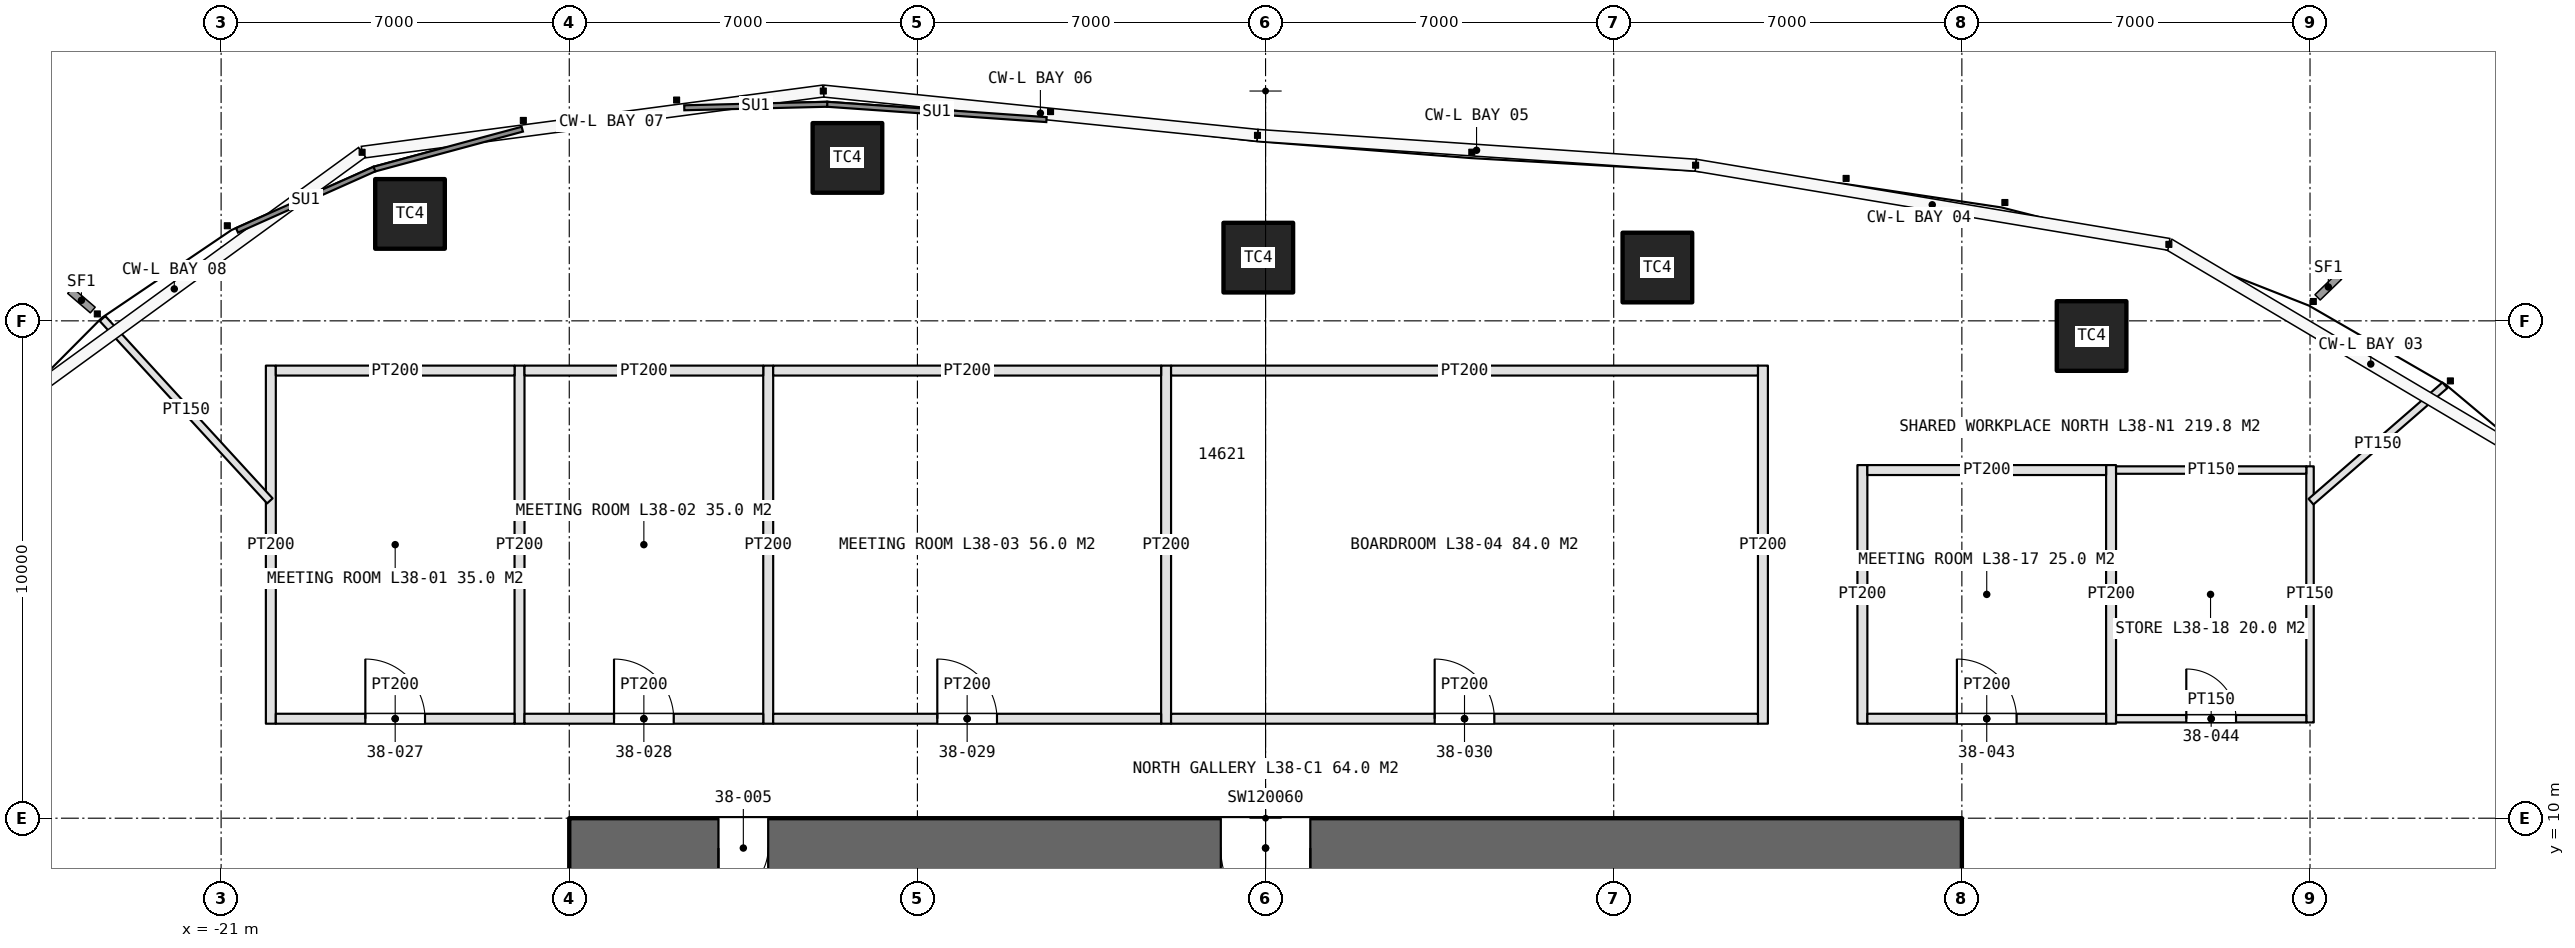
"""IFC4 building model, lengths in metres.
Left out: names, types, materials, properties, quantities, classifications, styles, units other than length and angle.
Written with IfcOpenShell. Run it as: python <this file> out.ifc"""

import sys

from ifc_helpers import new_model, si_unit, direction, frame, frame_2d, origin, origin_2d, place, context, subcontext, project, spatial, rectangle, extrude, element, fill, save


model = new_model("IFC4")
c1 = context("Model", 3, precision=1e-05, world=origin(), true_north=direction((0.0, 1.0)))
c2 = subcontext(c1, "Body", "Model", "MODEL_VIEW")
j1 = project(units=[si_unit("LENGTHUNIT", "METRE"), si_unit("PLANEANGLEUNIT", "RADIAN")], contexts=[c1])
p1 = place(None, origin())
s1 = spatial("IfcSite", under=j1, at=p1, CompositionType="ELEMENT")
p2 = place(p1, origin())
s2 = spatial("IfcBuilding", under=s1, at=p2, CompositionType="ELEMENT")
p3 = place(p2, frame((0.0, 0.0, 176.4)))
s3 = spatial("IfcBuildingStorey", under=s2, at=p3, CompositionType="ELEMENT", Elevation=176.4)
p4 = place(p3, frame((14.0, 9.4, 0.0), z_axis=(0.0, 0.0, 1.0), x_axis=(-1.0, 0.0, 0.0)))
e1 = element("IfcWall", 1, at=p4, inside=s3, PredefinedType="SHEAR", context=c2, shape_type="SweptSolid", body=[
    extrude(rectangle(XDim=28.0, YDim=1.2, at=frame_2d((14.0, 0.0))), origin(), (0.0, 0.0, 1.0), 4.2),
])
p5 = place(p4, frame((24.0, 0.0, 0.0)))
e2 = element("IfcOpeningElement", 2, at=p5, cuts=e1, PredefinedType="OPENING", context=c2, shape_type="SweptSolid", body=[
    extrude(rectangle(XDim=1.0, YDim=2.4, at=frame_2d((0.5, 1.2))), frame((0.0, 0.61, 0.0), z_axis=(0.0, -1.0, 0.0), x_axis=(1.0, 0.0, 0.0)), (0.0, 0.0, 1.0), 1.22),
])
p6 = place(p4, frame((13.1, 0.0, 0.0)))
e3 = element("IfcOpeningElement", 3, at=p6, cuts=e1, PredefinedType="OPENING", context=c2, shape_type="SweptSolid", body=[
    extrude(rectangle(XDim=1.8, YDim=2.4, at=frame_2d((0.9, 1.2))), frame((0.0, 0.61, 0.0), z_axis=(0.0, -1.0, 0.0), x_axis=(1.0, 0.0, 0.0)), (0.0, 0.0, 1.0), 1.22),
])
for number, where, z_axis, x_axis in (
    (4, (16.608, 19.695, 0.0), (0.0, 0.0, 1.0), (1.0, 0.0, 0.0)),
    (5, (7.878, 21.072, 0.0), (0.0, 0.0, 1.0), (1.0, 0.0, 0.0)),
    (6, (-0.146, 21.271, 0.0), (0.0, 0.0, 1.0), (1.0, 0.0, 0.0)),
    (7, (-8.407, 23.276, 0.0), (0.0, 0.0, 1.0), (1.0, 0.0, 0.0)),
    (8, (-17.202, 22.15, 0.0), (0.0, 0.0, 1.0), (1.0, 0.0, 0.0)),
):
    element("IfcColumn", number, at=place(p3, frame(where, z_axis=z_axis, x_axis=x_axis)), inside=s3, PredefinedType="COLUMN", context=c2, shape_type="SweptSolid", body=[
        extrude(rectangle(XDim=1.4, YDim=1.4, at=origin_2d()), origin(), (0.0, 0.0, 1.0), 4.2),
    ])
for number, where, z_axis, x_axis in (
    (9, (-20.0, 11.9, 0.0), (0.0, 0.0, 1.0), (0.0, 1.0, 0.0)),
    (10, (-15.0, 11.9, 0.0), (0.0, 0.0, 1.0), (0.0, 1.0, 0.0)),
    (11, (-10.0, 11.9, 0.0), (0.0, 0.0, 1.0), (0.0, 1.0, 0.0)),
    (12, (-2.0, 11.9, 0.0), (0.0, 0.0, 1.0), (0.0, 1.0, 0.0)),
    (13, (10.0, 11.9, 0.0), (0.0, 0.0, 1.0), (0.0, 1.0, 0.0)),
):
    element("IfcWall", number, at=place(p3, frame(where, z_axis=z_axis, x_axis=x_axis)), inside=s3, PredefinedType="PARTITIONING", context=c2, shape_type="SweptSolid", body=[
        extrude(rectangle(XDim=7.2, YDim=0.2, at=frame_2d((3.6, 0.0))), origin(), (0.0, 0.0, 1.0), 3.0),
    ])
p7 = place(p3, frame((-19.9, 12.0, 0.0), z_axis=(0.0, 0.0, 1.0), x_axis=(1.0, 0.0, 0.0)))
e14 = element("IfcWall", 14, at=p7, inside=s3, PredefinedType="PARTITIONING", context=c2, shape_type="SweptSolid", body=[
    extrude(rectangle(XDim=4.8, YDim=0.2, at=frame_2d((2.4, 0.0))), origin(), (0.0, 0.0, 1.0), 3.0),
])
p8 = place(p7, frame((1.8, 0.0, 0.0)))
e15 = element("IfcOpeningElement", 15, at=p8, cuts=e14, PredefinedType="OPENING", context=c2, shape_type="SweptSolid", body=[
    extrude(rectangle(XDim=1.2, YDim=2.4, at=frame_2d((0.6, 1.2))), frame((0.0, 0.11, 0.0), z_axis=(0.0, -1.0, 0.0), x_axis=(1.0, 0.0, 0.0)), (0.0, 0.0, 1.0), 0.22),
])
p9 = place(p3, frame((-19.9, 19.0, 0.0), z_axis=(0.0, 0.0, 1.0), x_axis=(1.0, 0.0, 0.0)))
e16 = element("IfcWall", 16, at=p9, inside=s3, PredefinedType="PARTITIONING", context=c2, shape_type="SweptSolid", body=[
    extrude(rectangle(XDim=4.8, YDim=0.2, at=frame_2d((2.4, 0.0))), origin(), (0.0, 0.0, 1.0), 3.0),
])
p10 = place(p3, frame((-14.9, 12.0, 0.0), z_axis=(0.0, 0.0, 1.0), x_axis=(1.0, 0.0, 0.0)))
e17 = element("IfcWall", 17, at=p10, inside=s3, PredefinedType="PARTITIONING", context=c2, shape_type="SweptSolid", body=[
    extrude(rectangle(XDim=4.8, YDim=0.2, at=frame_2d((2.4, 0.0))), origin(), (0.0, 0.0, 1.0), 3.0),
])
p11 = place(p10, frame((1.8, 0.0, 0.0)))
e18 = element("IfcOpeningElement", 18, at=p11, cuts=e17, PredefinedType="OPENING", context=c2, shape_type="SweptSolid", body=[
    extrude(rectangle(XDim=1.2, YDim=2.4, at=frame_2d((0.6, 1.2))), frame((0.0, 0.11, 0.0), z_axis=(0.0, -1.0, 0.0), x_axis=(1.0, 0.0, 0.0)), (0.0, 0.0, 1.0), 0.22),
])
p12 = place(p3, frame((-14.9, 19.0, 0.0), z_axis=(0.0, 0.0, 1.0), x_axis=(1.0, 0.0, 0.0)))
e19 = element("IfcWall", 19, at=p12, inside=s3, PredefinedType="PARTITIONING", context=c2, shape_type="SweptSolid", body=[
    extrude(rectangle(XDim=4.8, YDim=0.2, at=frame_2d((2.4, 0.0))), origin(), (0.0, 0.0, 1.0), 3.0),
])
p13 = place(p3, frame((-9.9, 12.0, 0.0), z_axis=(0.0, 0.0, 1.0), x_axis=(1.0, 0.0, 0.0)))
e20 = element("IfcWall", 20, at=p13, inside=s3, PredefinedType="PARTITIONING", context=c2, shape_type="SweptSolid", body=[
    extrude(rectangle(XDim=7.8, YDim=0.2, at=frame_2d((3.9, 0.0))), origin(), (0.0, 0.0, 1.0), 3.0),
])
p14 = place(p13, frame((3.3, 0.0, 0.0)))
e21 = element("IfcOpeningElement", 21, at=p14, cuts=e20, PredefinedType="OPENING", context=c2, shape_type="SweptSolid", body=[
    extrude(rectangle(XDim=1.2, YDim=2.4, at=frame_2d((0.6, 1.2))), frame((0.0, 0.11, 0.0), z_axis=(0.0, -1.0, 0.0), x_axis=(1.0, 0.0, 0.0)), (0.0, 0.0, 1.0), 0.22),
])
p15 = place(p3, frame((-9.9, 19.0, 0.0), z_axis=(0.0, 0.0, 1.0), x_axis=(1.0, 0.0, 0.0)))
e22 = element("IfcWall", 22, at=p15, inside=s3, PredefinedType="PARTITIONING", context=c2, shape_type="SweptSolid", body=[
    extrude(rectangle(XDim=7.8, YDim=0.2, at=frame_2d((3.9, 0.0))), origin(), (0.0, 0.0, 1.0), 3.0),
])
p16 = place(p3, frame((-1.9, 12.0, 0.0), z_axis=(0.0, 0.0, 1.0), x_axis=(1.0, 0.0, 0.0)))
e23 = element("IfcWall", 23, at=p16, inside=s3, PredefinedType="PARTITIONING", context=c2, shape_type="SweptSolid", body=[
    extrude(rectangle(XDim=11.8, YDim=0.2, at=frame_2d((5.9, 0.0))), origin(), (0.0, 0.0, 1.0), 3.0),
])
p17 = place(p16, frame((5.3, 0.0, 0.0)))
e24 = element("IfcOpeningElement", 24, at=p17, cuts=e23, PredefinedType="OPENING", context=c2, shape_type="SweptSolid", body=[
    extrude(rectangle(XDim=1.2, YDim=2.4, at=frame_2d((0.6, 1.2))), frame((0.0, 0.11, 0.0), z_axis=(0.0, -1.0, 0.0), x_axis=(1.0, 0.0, 0.0)), (0.0, 0.0, 1.0), 0.22),
])
p18 = place(p3, frame((-1.9, 19.0, 0.0), z_axis=(0.0, 0.0, 1.0), x_axis=(1.0, 0.0, 0.0)))
e25 = element("IfcWall", 25, at=p18, inside=s3, PredefinedType="PARTITIONING", context=c2, shape_type="SweptSolid", body=[
    extrude(rectangle(XDim=11.8, YDim=0.2, at=frame_2d((5.9, 0.0))), origin(), (0.0, 0.0, 1.0), 3.0),
])
for number, where, z_axis, x_axis in (
    (26, (12.0, 11.9, 0.0), (0.0, 0.0, 1.0), (0.0, 1.0, 0.0)),
    (27, (17.0, 11.9, 0.0), (0.0, 0.0, 1.0), (0.0, 1.0, 0.0)),
):
    element("IfcWall", number, at=place(p3, frame(where, z_axis=z_axis, x_axis=x_axis)), inside=s3, PredefinedType="PARTITIONING", context=c2, shape_type="SweptSolid", body=[
        extrude(rectangle(XDim=5.2, YDim=0.2, at=frame_2d((2.6, 0.0))), origin(), (0.0, 0.0, 1.0), 3.0),
    ])
p19 = place(p3, frame((21.0, 11.925, 0.0), z_axis=(0.0, 0.0, 1.0), x_axis=(0.0, 1.0, 0.0)))
e28 = element("IfcWall", 28, at=p19, inside=s3, PredefinedType="PARTITIONING", context=c2, shape_type="SweptSolid", body=[
    extrude(rectangle(XDim=5.15, YDim=0.15, at=frame_2d((2.575, 0.0))), origin(), (0.0, 0.0, 1.0), 3.0),
])
p20 = place(p3, frame((12.1, 12.0, 0.0), z_axis=(0.0, 0.0, 1.0), x_axis=(1.0, 0.0, 0.0)))
e29 = element("IfcWall", 29, at=p20, inside=s3, PredefinedType="PARTITIONING", context=c2, shape_type="SweptSolid", body=[
    extrude(rectangle(XDim=4.8, YDim=0.2, at=frame_2d((2.4, 0.0))), origin(), (0.0, 0.0, 1.0), 3.0),
])
p21 = place(p20, frame((1.8, 0.0, 0.0)))
e30 = element("IfcOpeningElement", 30, at=p21, cuts=e29, PredefinedType="OPENING", context=c2, shape_type="SweptSolid", body=[
    extrude(rectangle(XDim=1.2, YDim=2.4, at=frame_2d((0.6, 1.2))), frame((0.0, 0.11, 0.0), z_axis=(0.0, -1.0, 0.0), x_axis=(1.0, 0.0, 0.0)), (0.0, 0.0, 1.0), 0.22),
])
p22 = place(p3, frame((12.1, 17.0, 0.0), z_axis=(0.0, 0.0, 1.0), x_axis=(1.0, 0.0, 0.0)))
e31 = element("IfcWall", 31, at=p22, inside=s3, PredefinedType="PARTITIONING", context=c2, shape_type="SweptSolid", body=[
    extrude(rectangle(XDim=4.8, YDim=0.2, at=frame_2d((2.4, 0.0))), origin(), (0.0, 0.0, 1.0), 3.0),
])
p23 = place(p3, frame((17.1, 12.0, 0.0), z_axis=(0.0, 0.0, 1.0), x_axis=(1.0, 0.0, 0.0)))
e32 = element("IfcWall", 32, at=p23, inside=s3, PredefinedType="PARTITIONING", context=c2, shape_type="SweptSolid", body=[
    extrude(rectangle(XDim=3.825, YDim=0.15, at=frame_2d((1.913, 0.0))), origin(), (0.0, 0.0, 1.0), 3.0),
])
p24 = place(p23, frame((1.413, 0.0, 0.0)))
e33 = element("IfcOpeningElement", 33, at=p24, cuts=e32, PredefinedType="OPENING", context=c2, shape_type="SweptSolid", body=[
    extrude(rectangle(XDim=1.0, YDim=2.2, at=frame_2d((0.5, 1.1))), frame((0.0, 0.085, 0.0), z_axis=(0.0, -1.0, 0.0), x_axis=(1.0, 0.0, 0.0)), (0.0, 0.0, 1.0), 0.17),
])
p25 = place(p3, frame((17.1, 17.0, 0.0), z_axis=(0.0, 0.0, 1.0), x_axis=(1.0, 0.0, 0.0)))
e34 = element("IfcWall", 34, at=p25, inside=s3, PredefinedType="PARTITIONING", context=c2, shape_type="SweptSolid", body=[
    extrude(rectangle(XDim=3.825, YDim=0.15, at=frame_2d((1.913, 0.0))), origin(), (0.0, 0.0, 1.0), 3.0),
])
p26 = place(p3, frame((-20.02, 16.38, 0.0), z_axis=(0.0, 0.0, 1.0), x_axis=(-0.676159982548, 0.736754828963, 0.0)))
e35 = element("IfcWall", 35, at=p26, inside=s3, PredefinedType="PARTITIONING", context=c2, shape_type="SweptSolid", body=[
    extrude(rectangle(XDim=4.976, YDim=0.15, at=frame_2d((2.488, 0.0))), origin(), (0.0, 0.0, 1.0), 3.0),
])
p27 = place(p3, frame((21.02, 16.364, 0.0), z_axis=(0.0, 0.0, 1.0), x_axis=(0.75467183248, 0.656102450278, 0.0)))
e36 = element("IfcWall", 36, at=p27, inside=s3, PredefinedType="PARTITIONING", context=c2, shape_type="SweptSolid", body=[
    extrude(rectangle(XDim=3.567, YDim=0.15, at=frame_2d((1.783, 0.0))), origin(), (0.0, 0.0, 1.0), 3.0),
])
p28 = place(p5, origin())
e37 = element("IfcDoor", 37, at=p28, inside=s3, OperationType="SINGLE_SWING_RIGHT", PredefinedType="DOOR", context=c2, shape_type="SweptSolid", body=[
    extrude(rectangle(XDim=1.0, YDim=2.4, at=frame_2d((0.5, 1.2))), frame((0.0, 0.025, 0.0), z_axis=(0.0, -1.0, 0.0), x_axis=(1.0, 0.0, 0.0)), (0.0, 0.0, 1.0), 0.05),
])
fill(e2, e37)
p29 = place(p6, origin())
e38 = element("IfcDoor", 38, at=p29, inside=s3, OperationType="DOUBLE_DOOR_SINGLE_SWING", PredefinedType="DOOR", context=c2, shape_type="SweptSolid", body=[
    extrude(rectangle(XDim=1.8, YDim=2.4, at=frame_2d((0.9, 1.2))), frame((0.0, 0.025, 0.0), z_axis=(0.0, -1.0, 0.0), x_axis=(1.0, 0.0, 0.0)), (0.0, 0.0, 1.0), 0.05),
])
fill(e3, e38)
p30 = place(p8, origin())
e39 = element("IfcDoor", 39, at=p30, inside=s3, OperationType="SINGLE_SWING_LEFT", PredefinedType="DOOR", context=c2, shape_type="SweptSolid", body=[
    extrude(rectangle(XDim=1.2, YDim=2.4, at=frame_2d((0.6, 1.2))), frame((0.0, 0.025, 0.0), z_axis=(0.0, -1.0, 0.0), x_axis=(1.0, 0.0, 0.0)), (0.0, 0.0, 1.0), 0.05),
])
fill(e15, e39)
p31 = place(p11, origin())
e40 = element("IfcDoor", 40, at=p31, inside=s3, OperationType="SINGLE_SWING_LEFT", PredefinedType="DOOR", context=c2, shape_type="SweptSolid", body=[
    extrude(rectangle(XDim=1.2, YDim=2.4, at=frame_2d((0.6, 1.2))), frame((0.0, 0.025, 0.0), z_axis=(0.0, -1.0, 0.0), x_axis=(1.0, 0.0, 0.0)), (0.0, 0.0, 1.0), 0.05),
])
fill(e18, e40)
p32 = place(p14, origin())
e41 = element("IfcDoor", 41, at=p32, inside=s3, OperationType="SINGLE_SWING_LEFT", PredefinedType="DOOR", context=c2, shape_type="SweptSolid", body=[
    extrude(rectangle(XDim=1.2, YDim=2.4, at=frame_2d((0.6, 1.2))), frame((0.0, 0.025, 0.0), z_axis=(0.0, -1.0, 0.0), x_axis=(1.0, 0.0, 0.0)), (0.0, 0.0, 1.0), 0.05),
])
fill(e21, e41)
p33 = place(p17, origin())
e42 = element("IfcDoor", 42, at=p33, inside=s3, OperationType="SINGLE_SWING_LEFT", PredefinedType="DOOR", context=c2, shape_type="SweptSolid", body=[
    extrude(rectangle(XDim=1.2, YDim=2.4, at=frame_2d((0.6, 1.2))), frame((0.0, 0.025, 0.0), z_axis=(0.0, -1.0, 0.0), x_axis=(1.0, 0.0, 0.0)), (0.0, 0.0, 1.0), 0.05),
])
fill(e24, e42)
p34 = place(p21, origin())
e43 = element("IfcDoor", 43, at=p34, inside=s3, OperationType="SINGLE_SWING_LEFT", PredefinedType="DOOR", context=c2, shape_type="SweptSolid", body=[
    extrude(rectangle(XDim=1.2, YDim=2.4, at=frame_2d((0.6, 1.2))), frame((0.0, 0.025, 0.0), z_axis=(0.0, -1.0, 0.0), x_axis=(1.0, 0.0, 0.0)), (0.0, 0.0, 1.0), 0.05),
])
fill(e30, e43)
p35 = place(p24, origin())
e44 = element("IfcDoor", 44, at=p35, inside=s3, OperationType="SINGLE_SWING_LEFT", PredefinedType="DOOR", context=c2, shape_type="SweptSolid", body=[
    extrude(rectangle(XDim=1.0, YDim=2.2, at=frame_2d((0.5, 1.1))), frame((0.0, 0.025, 0.0), z_axis=(0.0, -1.0, 0.0), x_axis=(1.0, 0.0, 0.0)), (0.0, 0.0, 1.0), 0.05),
])
fill(e33, e44)
save(model, sys.argv[1])
